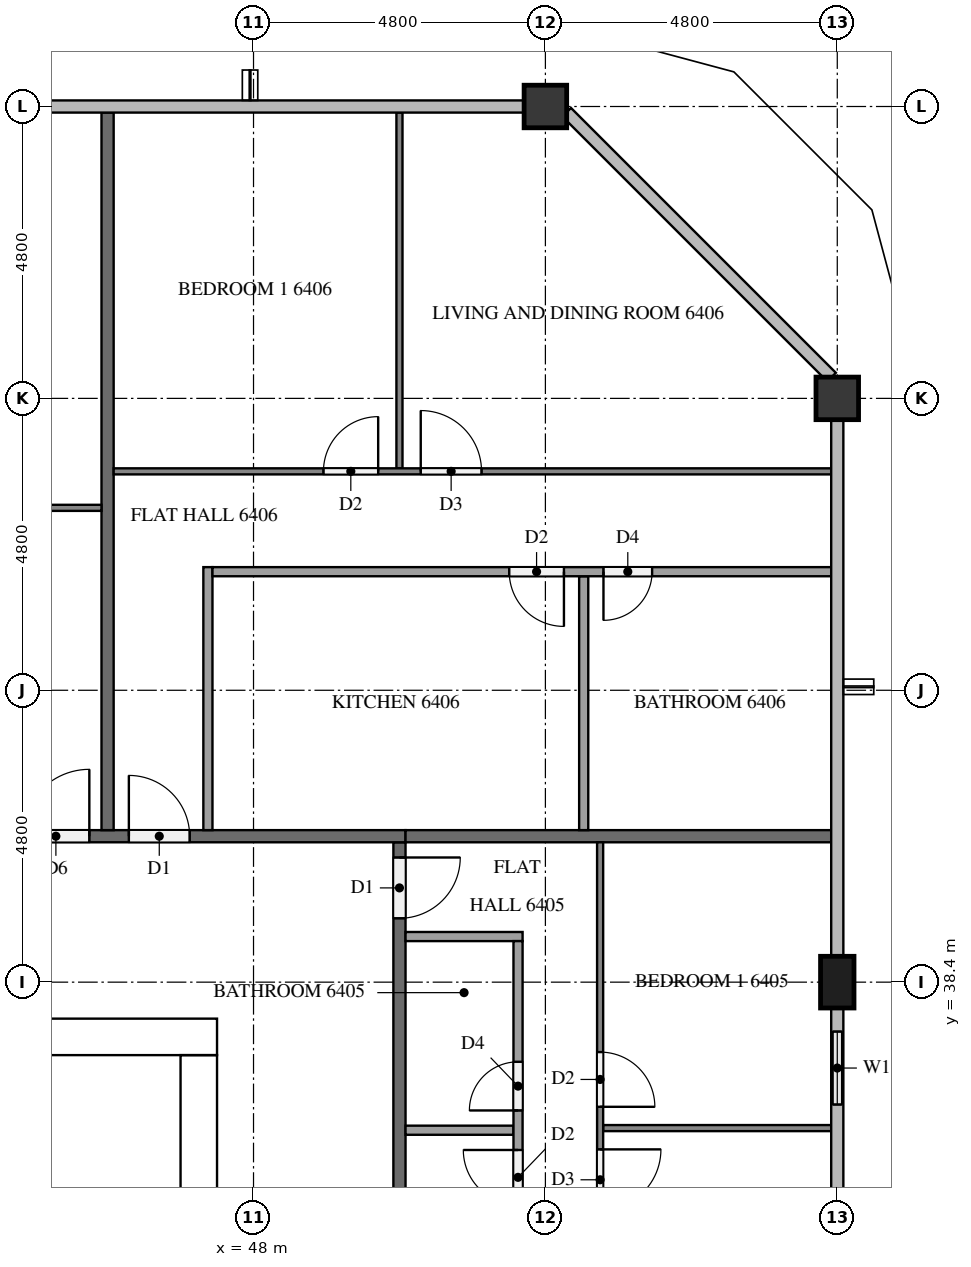
"""IFC4 building model, lengths in metres.
Left out: names, types, materials, properties, quantities, classifications, styles, units other than length and angle.
Written with IfcOpenShell. Run it as: python <this file> out.ifc"""

import sys

from ifc_helpers import new_model, si_unit, direction, frame, frame_2d, origin, origin_2d, place, context, subcontext, project, spatial, rectangle, extrude, element, fill, save


model = new_model("IFC4")
c1 = context("Model", 3, precision=1e-05, world=origin(), true_north=direction((0.0, 1.0)))
c2 = subcontext(c1, "Body", "Model", "MODEL_VIEW")
j1 = project(units=[si_unit("LENGTHUNIT", "METRE"), si_unit("PLANEANGLEUNIT", "RADIAN")], contexts=[c1])
p1 = place(None, origin())
s1 = spatial("IfcSite", under=j1, at=p1, CompositionType="ELEMENT")
p2 = place(p1, origin())
s2 = spatial("IfcBuilding", under=s1, at=p2, CompositionType="ELEMENT")
p3 = place(p2, frame((0.0, 0.0, 245.7)))
s3 = spatial("IfcBuildingStorey", under=s2, at=p3, CompositionType="ELEMENT", Elevation=245.7)
p4 = place(p3, frame((15.0, 37.5, 0.0), z_axis=(0.0, 0.0, 1.0), x_axis=(1.0, 0.0, 0.0)))
e1 = element("IfcWall", 1, at=p4, inside=s3, PredefinedType="SHEAR", context=c2, shape_type="SweptSolid", body=[
    extrude(rectangle(XDim=32.4, YDim=0.6, at=frame_2d((16.2, 0.0))), origin(), (0.0, 0.0, 1.0), 3.2),
])
p5 = place(p4, frame((15.3, 0.0, 0.0)))
e2 = element("IfcOpeningElement", 2, at=p5, cuts=e1, PredefinedType="OPENING", context=c2, shape_type="SweptSolid", body=[
    extrude(rectangle(XDim=1.8, YDim=2.1, at=frame_2d((0.9, 1.05))), frame((0.0, 0.31, 0.0), z_axis=(0.0, -1.0, 0.0), x_axis=(1.0, 0.0, 0.0)), (0.0, 0.0, 1.0), 0.62),
])
p6 = place(p4, frame((1.25, 0.0, 0.0)))
e3 = element("IfcOpeningElement", 3, at=p6, cuts=e1, PredefinedType="OPENING", context=c2, shape_type="SweptSolid", body=[
    extrude(rectangle(XDim=1.0, YDim=2.1, at=frame_2d((0.5, 1.05))), frame((0.0, 0.31, 0.0), z_axis=(0.0, -1.0, 0.0), x_axis=(1.0, 0.0, 0.0)), (0.0, 0.0, 1.0), 0.62),
])
p7 = place(p4, frame((4.988, 0.0, 0.0)))
e4 = element("IfcOpeningElement", 4, at=p7, cuts=e1, PredefinedType="OPENING", context=c2, shape_type="SweptSolid", body=[
    extrude(rectangle(XDim=1.0, YDim=2.1, at=frame_2d((0.5, 1.05))), frame((0.0, 0.31, 0.0), z_axis=(0.0, -1.0, 0.0), x_axis=(1.0, 0.0, 0.0)), (0.0, 0.0, 1.0), 0.62),
])
p8 = place(p3, frame((47.1, 15.6, 0.0), z_axis=(0.0, 0.0, 1.0), x_axis=(0.0, 1.0, 0.0)))
e5 = element("IfcWall", 5, at=p8, inside=s3, PredefinedType="SHEAR", context=c2, shape_type="SweptSolid", body=[
    extrude(rectangle(XDim=21.6, YDim=0.6, at=frame_2d((10.8, 0.0))), origin(), (0.0, 0.0, 1.0), 3.2),
])
p9 = place(p8, frame((10.5, 0.0, 0.0)))
e6 = element("IfcOpeningElement", 6, at=p9, cuts=e5, PredefinedType="OPENING", context=c2, shape_type="SweptSolid", body=[
    extrude(rectangle(XDim=1.2, YDim=2.1, at=frame_2d((0.6, 1.05))), frame((0.0, 0.31, 0.0), z_axis=(0.0, -1.0, 0.0), x_axis=(1.0, 0.0, 0.0)), (0.0, 0.0, 1.0), 0.62),
])
p10 = place(p3, frame((57.6, 38.4, 0.0), z_axis=(0.0, 0.0, 1.0), x_axis=(0.0, 1.0, 0.0)))
e7 = element("IfcColumn", 7, at=p10, inside=s3, PredefinedType="COLUMN", context=c2, shape_type="SweptSolid", body=[
    extrude(rectangle(XDim=0.85, YDim=0.55, at=origin_2d()), origin(), (0.0, 0.0, 1.0), 3.2),
])
for number, where, z_axis, x_axis in (
    (8, (57.6, 48.0, 0.0), (0.0, 0.0, 1.0), (1.0, 0.0, 0.0)),
    (9, (52.8, 52.8, 0.0), (0.0, 0.0, 1.0), (1.0, 0.0, 0.0)),
):
    element("IfcColumn", number, at=place(p3, frame(where, z_axis=z_axis, x_axis=x_axis)), inside=s3, PredefinedType="COLUMN", context=c2, shape_type="SweptSolid", body=[
        extrude(rectangle(XDim=0.7, YDim=0.7, at=origin_2d()), origin(), (0.0, 0.0, 1.0), 3.2),
    ])
p11 = place(p3, frame((57.6, 36.0, 0.0), z_axis=(0.0, 0.0, 1.0), x_axis=(0.0, 1.0, 0.0)))
e10 = element("IfcWall", 10, at=p11, inside=s3, PredefinedType="SOLIDWALL", context=c2, shape_type="SweptSolid", body=[
    extrude(rectangle(XDim=1.975, YDim=0.15, at=frame_2d((0.988, 0.0))), origin(), (0.0, 0.0, 1.0), 3.2),
])
p12 = place(p11, frame((0.387, 0.0, 0.9)))
e11 = element("IfcOpeningElement", 11, at=p12, cuts=e10, PredefinedType="OPENING", context=c2, shape_type="SweptSolid", body=[
    extrude(rectangle(XDim=1.2, YDim=1.4, at=frame_2d((0.6, 0.7))), frame((0.0, 0.085, 0.0), z_axis=(0.0, -1.0, 0.0), x_axis=(1.0, 0.0, 0.0)), (0.0, 0.0, 1.0), 0.17),
])
p13 = place(p3, frame((50.4, 40.7, 0.0), z_axis=(0.0, 0.0, 1.0), x_axis=(0.0, -1.0, 0.0)))
e12 = element("IfcWall", 12, at=p13, inside=s3, PredefinedType="PARTITIONING", context=c2, shape_type="SweptSolid", body=[
    extrude(rectangle(XDim=28.6, YDim=0.2, at=frame_2d((14.3, 0.0))), origin(), (0.0, 0.0, 1.0), 3.2),
])
p14 = place(p13, frame((27.3, 0.0, 0.0)))
e13 = element("IfcOpeningElement", 13, at=p14, cuts=e12, PredefinedType="OPENING", context=c2, shape_type="SweptSolid", body=[
    extrude(rectangle(XDim=1.1, YDim=2.1, at=frame_2d((0.55, 1.05))), frame((0.0, 0.11, 0.0), z_axis=(0.0, -1.0, 0.0), x_axis=(1.0, 0.0, 0.0)), (0.0, 0.0, 1.0), 0.22),
])
p15 = place(p13, frame((0.25, 0.0, 0.0)))
e14 = element("IfcOpeningElement", 14, at=p15, cuts=e12, PredefinedType="OPENING", context=c2, shape_type="SweptSolid", body=[
    extrude(rectangle(XDim=1.0, YDim=2.1, at=frame_2d((0.5, 1.05))), frame((0.0, 0.11, 0.0), z_axis=(0.0, -1.0, 0.0), x_axis=(1.0, 0.0, 0.0)), (0.0, 0.0, 1.0), 0.22),
])
p16 = place(p3, frame((11.9, 40.8, 0.0), z_axis=(0.0, 0.0, 1.0), x_axis=(1.0, 0.0, 0.0)))
e15 = element("IfcWall", 15, at=p16, inside=s3, PredefinedType="PARTITIONING", context=c2, shape_type="SweptSolid", body=[
    extrude(rectangle(XDim=38.6, YDim=0.2, at=frame_2d((19.3, 0.0))), origin(), (0.0, 0.0, 1.0), 3.2),
])
p17 = place(p16, frame((34.05, 0.0, 0.0)))
e16 = element("IfcOpeningElement", 16, at=p17, cuts=e15, PredefinedType="OPENING", context=c2, shape_type="SweptSolid", body=[
    extrude(rectangle(XDim=1.0, YDim=2.1, at=frame_2d((0.5, 1.05))), frame((0.0, 0.11, 0.0), z_axis=(0.0, -1.0, 0.0), x_axis=(1.0, 0.0, 0.0)), (0.0, 0.0, 1.0), 0.22),
])
p18 = place(p16, frame((32.3, 0.0, 0.0)))
e17 = element("IfcOpeningElement", 17, at=p18, cuts=e15, PredefinedType="OPENING", context=c2, shape_type="SweptSolid", body=[
    extrude(rectangle(XDim=1.1, YDim=2.1, at=frame_2d((0.55, 1.05))), frame((0.0, 0.11, 0.0), z_axis=(0.0, -1.0, 0.0), x_axis=(1.0, 0.0, 0.0)), (0.0, 0.0, 1.0), 0.22),
])
p19 = place(p16, frame((2.85, 0.0, 0.0)))
e18 = element("IfcOpeningElement", 18, at=p19, cuts=e15, PredefinedType="OPENING", context=c2, shape_type="SweptSolid", body=[
    extrude(rectangle(XDim=1.0, YDim=2.1, at=frame_2d((0.5, 1.05))), frame((0.0, 0.11, 0.0), z_axis=(0.0, -1.0, 0.0), x_axis=(1.0, 0.0, 0.0)), (0.0, 0.0, 1.0), 0.22),
])
p20 = place(p16, frame((1.15, 0.0, 0.0)))
e19 = element("IfcOpeningElement", 19, at=p20, cuts=e15, PredefinedType="OPENING", context=c2, shape_type="SweptSolid", body=[
    extrude(rectangle(XDim=1.0, YDim=2.1, at=frame_2d((0.5, 1.05))), frame((0.0, 0.11, 0.0), z_axis=(0.0, -1.0, 0.0), x_axis=(1.0, 0.0, 0.0)), (0.0, 0.0, 1.0), 0.22),
])
p21 = place(p3, frame((50.5, 40.8, 0.0), z_axis=(0.0, 0.0, 1.0), x_axis=(1.0, 0.0, 0.0)))
e20 = element("IfcWall", 20, at=p21, inside=s3, PredefinedType="PARTITIONING", context=c2, shape_type="SweptSolid", body=[
    extrude(rectangle(XDim=7.0, YDim=0.2, at=frame_2d((3.5, 0.0))), origin(), (0.0, 0.0, 1.0), 3.2),
])
p22 = place(p3, frame((45.6, 52.7, 0.0), z_axis=(0.0, 0.0, 1.0), x_axis=(0.0, -1.0, 0.0)))
e21 = element("IfcWall", 21, at=p22, inside=s3, PredefinedType="PARTITIONING", context=c2, shape_type="SweptSolid", body=[
    extrude(rectangle(XDim=11.8, YDim=0.2, at=frame_2d((5.9, 0.0))), origin(), (0.0, 0.0, 1.0), 3.2),
])
p23 = place(p3, frame((53.75, 36.0, 0.0), z_axis=(0.0, 0.0, 1.0), x_axis=(1.0, 0.0, 0.0)))
e22 = element("IfcWall", 22, at=p23, inside=s3, PredefinedType="PARTITIONING", context=c2, shape_type="SweptSolid", body=[
    extrude(rectangle(XDim=3.75, YDim=0.1, at=frame_2d((1.875, 0.0))), origin(), (0.0, 0.0, 1.0), 3.2),
])
p24 = place(p3, frame((53.7, 40.7, 0.0), z_axis=(0.0, 0.0, 1.0), x_axis=(0.0, -1.0, 0.0)))
e23 = element("IfcWall", 23, at=p24, inside=s3, PredefinedType="PARTITIONING", context=c2, shape_type="SweptSolid", body=[
    extrude(rectangle(XDim=9.4, YDim=0.1, at=frame_2d((4.7, 0.0))), origin(), (0.0, 0.0, 1.0), 3.2),
])
p25 = place(p24, frame((3.45, 0.0, 0.0)))
e24 = element("IfcOpeningElement", 24, at=p25, cuts=e23, PredefinedType="OPENING", context=c2, shape_type="SweptSolid", body=[
    extrude(rectangle(XDim=0.9, YDim=2.1, at=frame_2d((0.45, 1.05))), frame((0.0, 0.06, 0.0), z_axis=(0.0, -1.0, 0.0), x_axis=(1.0, 0.0, 0.0)), (0.0, 0.0, 1.0), 0.12),
])
p26 = place(p24, frame((5.05, 0.0, 0.0)))
e25 = element("IfcOpeningElement", 25, at=p26, cuts=e23, PredefinedType="OPENING", context=c2, shape_type="SweptSolid", body=[
    extrude(rectangle(XDim=1.0, YDim=2.1, at=frame_2d((0.5, 1.05))), frame((0.0, 0.06, 0.0), z_axis=(0.0, -1.0, 0.0), x_axis=(1.0, 0.0, 0.0)), (0.0, 0.0, 1.0), 0.12),
])
p27 = place(p3, frame((50.5, 35.965, 0.0), z_axis=(0.0, 0.0, 1.0), x_axis=(1.0, 0.0, 0.0)))
e26 = element("IfcWall", 26, at=p27, inside=s3, PredefinedType="PARTITIONING", context=c2, shape_type="SweptSolid", body=[
    extrude(rectangle(XDim=1.775, YDim=0.15, at=frame_2d((0.887, 0.0))), origin(), (0.0, 0.0, 1.0), 3.2),
])
p28 = place(p3, frame((50.5, 39.15, 0.0), z_axis=(0.0, 0.0, 1.0), x_axis=(1.0, 0.0, 0.0)))
e27 = element("IfcWall", 27, at=p28, inside=s3, PredefinedType="PARTITIONING", context=c2, shape_type="SweptSolid", body=[
    extrude(rectangle(XDim=1.925, YDim=0.15, at=frame_2d((0.962, 0.0))), origin(), (0.0, 0.0, 1.0), 3.2),
])
p29 = place(p3, frame((52.35, 31.3, 0.0), z_axis=(0.0, 0.0, 1.0), x_axis=(0.0, 1.0, 0.0)))
e28 = element("IfcWall", 28, at=p29, inside=s3, PredefinedType="PARTITIONING", context=c2, shape_type="SweptSolid", body=[
    extrude(rectangle(XDim=7.775, YDim=0.15, at=frame_2d((3.887, 0.0))), origin(), (0.0, 0.0, 1.0), 3.2),
])
p30 = place(p29, frame((4.99, 0.0, 0.0)))
e29 = element("IfcOpeningElement", 29, at=p30, cuts=e28, PredefinedType="OPENING", context=c2, shape_type="SweptSolid", body=[
    extrude(rectangle(XDim=0.8, YDim=2.1, at=frame_2d((0.4, 1.05))), frame((0.0, 0.085, 0.0), z_axis=(0.0, -1.0, 0.0), x_axis=(1.0, 0.0, 0.0)), (0.0, 0.0, 1.0), 0.17),
])
p31 = place(p29, frame((3.44, 0.0, 0.0)))
e30 = element("IfcOpeningElement", 30, at=p31, cuts=e28, PredefinedType="OPENING", context=c2, shape_type="SweptSolid", body=[
    extrude(rectangle(XDim=0.9, YDim=2.1, at=frame_2d((0.45, 1.05))), frame((0.0, 0.085, 0.0), z_axis=(0.0, -1.0, 0.0), x_axis=(1.0, 0.0, 0.0)), (0.0, 0.0, 1.0), 0.17),
])
p32 = place(p3, frame((50.4, 46.85, 0.0), z_axis=(0.0, 0.0, 1.0), x_axis=(0.0, 1.0, 0.0)))
e31 = element("IfcWall", 31, at=p32, inside=s3, PredefinedType="PARTITIONING", context=c2, shape_type="SweptSolid", body=[
    extrude(rectangle(XDim=5.85, YDim=0.1, at=frame_2d((2.925, 0.0))), origin(), (0.0, 0.0, 1.0), 3.2),
])
p33 = place(p3, frame((45.7, 46.8, 0.0), z_axis=(0.0, 0.0, 1.0), x_axis=(1.0, 0.0, 0.0)))
e32 = element("IfcWall", 32, at=p33, inside=s3, PredefinedType="PARTITIONING", context=c2, shape_type="SweptSolid", body=[
    extrude(rectangle(XDim=11.8, YDim=0.1, at=frame_2d((5.9, 0.0))), origin(), (0.0, 0.0, 1.0), 3.2),
])
p34 = place(p33, frame((3.45, 0.0, 0.0)))
e33 = element("IfcOpeningElement", 33, at=p34, cuts=e32, PredefinedType="OPENING", context=c2, shape_type="SweptSolid", body=[
    extrude(rectangle(XDim=0.9, YDim=2.1, at=frame_2d((0.45, 1.05))), frame((0.0, 0.06, 0.0), z_axis=(0.0, -1.0, 0.0), x_axis=(1.0, 0.0, 0.0)), (0.0, 0.0, 1.0), 0.12),
])
p35 = place(p33, frame((5.05, 0.0, 0.0)))
e34 = element("IfcOpeningElement", 34, at=p35, cuts=e32, PredefinedType="OPENING", context=c2, shape_type="SweptSolid", body=[
    extrude(rectangle(XDim=1.0, YDim=2.1, at=frame_2d((0.5, 1.05))), frame((0.0, 0.06, 0.0), z_axis=(0.0, -1.0, 0.0), x_axis=(1.0, 0.0, 0.0)), (0.0, 0.0, 1.0), 0.12),
])
p36 = place(p3, frame((53.43, 40.9, 0.0), z_axis=(0.0, 0.0, 1.0), x_axis=(0.0, 1.0, 0.0)))
e35 = element("IfcWall", 35, at=p36, inside=s3, PredefinedType="PARTITIONING", context=c2, shape_type="SweptSolid", body=[
    extrude(rectangle(XDim=4.175, YDim=0.15, at=frame_2d((2.087, 0.0))), origin(), (0.0, 0.0, 1.0), 3.2),
])
p37 = place(p3, frame((47.25, 40.9, 0.0), z_axis=(0.0, 0.0, 1.0), x_axis=(0.0, 1.0, 0.0)))
e36 = element("IfcWall", 36, at=p37, inside=s3, PredefinedType="PARTITIONING", context=c2, shape_type="SweptSolid", body=[
    extrude(rectangle(XDim=4.325, YDim=0.15, at=frame_2d((2.163, 0.0))), origin(), (0.0, 0.0, 1.0), 3.2),
])
p38 = place(p3, frame((57.5, 45.15, 0.0), z_axis=(0.0, 0.0, 1.0), x_axis=(-1.0, 0.0, 0.0)))
e37 = element("IfcWall", 37, at=p38, inside=s3, PredefinedType="PARTITIONING", context=c2, shape_type="SweptSolid", body=[
    extrude(rectangle(XDim=10.175, YDim=0.15, at=frame_2d((5.087, 0.0))), origin(), (0.0, 0.0, 1.0), 3.2),
])
p39 = place(p38, frame((4.395, 0.0, 0.0)))
e38 = element("IfcOpeningElement", 38, at=p39, cuts=e37, PredefinedType="OPENING", context=c2, shape_type="SweptSolid", body=[
    extrude(rectangle(XDim=0.9, YDim=2.1, at=frame_2d((0.45, 1.05))), frame((0.0, 0.085, 0.0), z_axis=(0.0, -1.0, 0.0), x_axis=(1.0, 0.0, 0.0)), (0.0, 0.0, 1.0), 0.17),
])
p40 = place(p38, frame((2.945, 0.0, 0.0)))
e39 = element("IfcOpeningElement", 39, at=p40, cuts=e37, PredefinedType="OPENING", context=c2, shape_type="SweptSolid", body=[
    extrude(rectangle(XDim=0.8, YDim=2.1, at=frame_2d((0.4, 1.05))), frame((0.0, 0.085, 0.0), z_axis=(0.0, -1.0, 0.0), x_axis=(1.0, 0.0, 0.0)), (0.0, 0.0, 1.0), 0.17),
])
p41 = place(p3, frame((26.5, 46.2, 0.0), z_axis=(0.0, 0.0, 1.0), x_axis=(1.0, 0.0, 0.0)))
e40 = element("IfcWall", 40, at=p41, inside=s3, PredefinedType="PARTITIONING", context=c2, shape_type="SweptSolid", body=[
    extrude(rectangle(XDim=19.0, YDim=0.1, at=frame_2d((9.5, 0.0))), origin(), (0.0, 0.0, 1.0), 3.2),
])
p42 = place(p41, frame((14.65, 0.0, 0.0)))
e41 = element("IfcOpeningElement", 41, at=p42, cuts=e40, PredefinedType="OPENING", context=c2, shape_type="SweptSolid", body=[
    extrude(rectangle(XDim=0.9, YDim=2.1, at=frame_2d((0.45, 1.05))), frame((0.0, 0.06, 0.0), z_axis=(0.0, -1.0, 0.0), x_axis=(1.0, 0.0, 0.0)), (0.0, 0.0, 1.0), 0.12),
])
p43 = place(p41, frame((13.05, 0.0, 0.0)))
e42 = element("IfcOpeningElement", 42, at=p43, cuts=e40, PredefinedType="OPENING", context=c2, shape_type="SweptSolid", body=[
    extrude(rectangle(XDim=0.9, YDim=2.1, at=frame_2d((0.45, 1.05))), frame((0.0, 0.06, 0.0), z_axis=(0.0, -1.0, 0.0), x_axis=(1.0, 0.0, 0.0)), (0.0, 0.0, 1.0), 0.12),
])
p44 = place(p41, frame((5.05, 0.0, 0.0)))
e43 = element("IfcOpeningElement", 43, at=p44, cuts=e40, PredefinedType="OPENING", context=c2, shape_type="SweptSolid", body=[
    extrude(rectangle(XDim=0.9, YDim=2.1, at=frame_2d((0.45, 1.05))), frame((0.0, 0.06, 0.0), z_axis=(0.0, -1.0, 0.0), x_axis=(1.0, 0.0, 0.0)), (0.0, 0.0, 1.0), 0.12),
])
p45 = place(p41, frame((3.35, 0.0, 0.0)))
e44 = element("IfcOpeningElement", 44, at=p45, cuts=e40, PredefinedType="OPENING", context=c2, shape_type="SweptSolid", body=[
    extrude(rectangle(XDim=1.0, YDim=2.1, at=frame_2d((0.5, 1.05))), frame((0.0, 0.06, 0.0), z_axis=(0.0, -1.0, 0.0), x_axis=(1.0, 0.0, 0.0)), (0.0, 0.0, 1.0), 0.12),
])
p46 = place(p12, origin())
e45 = element("IfcWindow", 45, at=p46, inside=s3, PartitioningType="SINGLE_PANEL", PredefinedType="WINDOW", context=c2, shape_type="SweptSolid", body=[
    extrude(rectangle(XDim=1.2, YDim=1.4, at=frame_2d((0.6, 0.7))), frame((0.0, 0.03, 0.0), z_axis=(0.0, -1.0, 0.0), x_axis=(1.0, 0.0, 0.0)), (0.0, 0.0, 1.0), 0.06),
])
fill(e11, e45)
p47 = place(p15, origin())
e46 = element("IfcDoor", 46, at=p47, inside=s3, OperationType="SINGLE_SWING_LEFT", PredefinedType="DOOR", context=c2, shape_type="SweptSolid", body=[
    extrude(rectangle(XDim=1.0, YDim=2.1, at=frame_2d((0.5, 1.05))), frame((0.0, 0.025, 0.0), z_axis=(0.0, -1.0, 0.0), x_axis=(1.0, 0.0, 0.0)), (0.0, 0.0, 1.0), 0.05),
])
fill(e14, e46)
p48 = place(p17, origin())
e47 = element("IfcDoor", 47, at=p48, inside=s3, OperationType="SINGLE_SWING_LEFT", PredefinedType="DOOR", context=c2, shape_type="SweptSolid", body=[
    extrude(rectangle(XDim=1.0, YDim=2.1, at=frame_2d((0.5, 1.05))), frame((0.0, 0.025, 0.0), z_axis=(0.0, -1.0, 0.0), x_axis=(1.0, 0.0, 0.0)), (0.0, 0.0, 1.0), 0.05),
])
fill(e16, e47)
p49 = place(p18, origin())
e48 = element("IfcDoor", 48, at=p49, inside=s3, OperationType="SINGLE_SWING_RIGHT", PredefinedType="DOOR", context=c2, shape_type="SweptSolid", body=[
    extrude(rectangle(XDim=1.1, YDim=2.1, at=frame_2d((0.55, 1.05))), frame((0.0, 0.025, 0.0), z_axis=(0.0, -1.0, 0.0), x_axis=(1.0, 0.0, 0.0)), (0.0, 0.0, 1.0), 0.05),
])
fill(e17, e48)
p50 = place(p25, origin())
e49 = element("IfcDoor", 49, at=p50, inside=s3, OperationType="SINGLE_SWING_RIGHT", PredefinedType="DOOR", context=c2, shape_type="SweptSolid", body=[
    extrude(rectangle(XDim=0.9, YDim=2.1, at=frame_2d((0.45, 1.05))), frame((0.0, 0.025, 0.0), z_axis=(0.0, -1.0, 0.0), x_axis=(1.0, 0.0, 0.0)), (0.0, 0.0, 1.0), 0.05),
])
fill(e24, e49)
p51 = place(p26, origin())
e50 = element("IfcDoor", 50, at=p51, inside=s3, OperationType="SINGLE_SWING_LEFT", PredefinedType="DOOR", context=c2, shape_type="SweptSolid", body=[
    extrude(rectangle(XDim=1.0, YDim=2.1, at=frame_2d((0.5, 1.05))), frame((0.0, 0.025, 0.0), z_axis=(0.0, -1.0, 0.0), x_axis=(1.0, 0.0, 0.0)), (0.0, 0.0, 1.0), 0.05),
])
fill(e25, e50)
p52 = place(p30, origin())
e51 = element("IfcDoor", 51, at=p52, inside=s3, OperationType="SINGLE_SWING_LEFT", PredefinedType="DOOR", context=c2, shape_type="SweptSolid", body=[
    extrude(rectangle(XDim=0.8, YDim=2.1, at=frame_2d((0.4, 1.05))), frame((0.0, 0.025, 0.0), z_axis=(0.0, -1.0, 0.0), x_axis=(1.0, 0.0, 0.0)), (0.0, 0.0, 1.0), 0.05),
])
fill(e29, e51)
p53 = place(p31, origin())
e52 = element("IfcDoor", 52, at=p53, inside=s3, OperationType="SINGLE_SWING_RIGHT", PredefinedType="DOOR", context=c2, shape_type="SweptSolid", body=[
    extrude(rectangle(XDim=0.9, YDim=2.1, at=frame_2d((0.45, 1.05))), frame((0.0, 0.025, 0.0), z_axis=(0.0, -1.0, 0.0), x_axis=(1.0, 0.0, 0.0)), (0.0, 0.0, 1.0), 0.05),
])
fill(e30, e52)
p54 = place(p34, origin())
e53 = element("IfcDoor", 53, at=p54, inside=s3, OperationType="SINGLE_SWING_RIGHT", PredefinedType="DOOR", context=c2, shape_type="SweptSolid", body=[
    extrude(rectangle(XDim=0.9, YDim=2.1, at=frame_2d((0.45, 1.05))), frame((0.0, 0.025, 0.0), z_axis=(0.0, -1.0, 0.0), x_axis=(1.0, 0.0, 0.0)), (0.0, 0.0, 1.0), 0.05),
])
fill(e33, e53)
p55 = place(p35, origin())
e54 = element("IfcDoor", 54, at=p55, inside=s3, OperationType="SINGLE_SWING_LEFT", PredefinedType="DOOR", context=c2, shape_type="SweptSolid", body=[
    extrude(rectangle(XDim=1.0, YDim=2.1, at=frame_2d((0.5, 1.05))), frame((0.0, 0.025, 0.0), z_axis=(0.0, -1.0, 0.0), x_axis=(1.0, 0.0, 0.0)), (0.0, 0.0, 1.0), 0.05),
])
fill(e34, e54)
p56 = place(p39, origin())
e55 = element("IfcDoor", 55, at=p56, inside=s3, OperationType="SINGLE_SWING_LEFT", PredefinedType="DOOR", context=c2, shape_type="SweptSolid", body=[
    extrude(rectangle(XDim=0.9, YDim=2.1, at=frame_2d((0.45, 1.05))), frame((0.0, 0.025, 0.0), z_axis=(0.0, -1.0, 0.0), x_axis=(1.0, 0.0, 0.0)), (0.0, 0.0, 1.0), 0.05),
])
fill(e38, e55)
p57 = place(p40, origin())
e56 = element("IfcDoor", 56, at=p57, inside=s3, OperationType="SINGLE_SWING_RIGHT", PredefinedType="DOOR", context=c2, shape_type="SweptSolid", body=[
    extrude(rectangle(XDim=0.8, YDim=2.1, at=frame_2d((0.4, 1.05))), frame((0.0, 0.025, 0.0), z_axis=(0.0, -1.0, 0.0), x_axis=(1.0, 0.0, 0.0)), (0.0, 0.0, 1.0), 0.05),
])
fill(e39, e56)
save(model, sys.argv[1])
